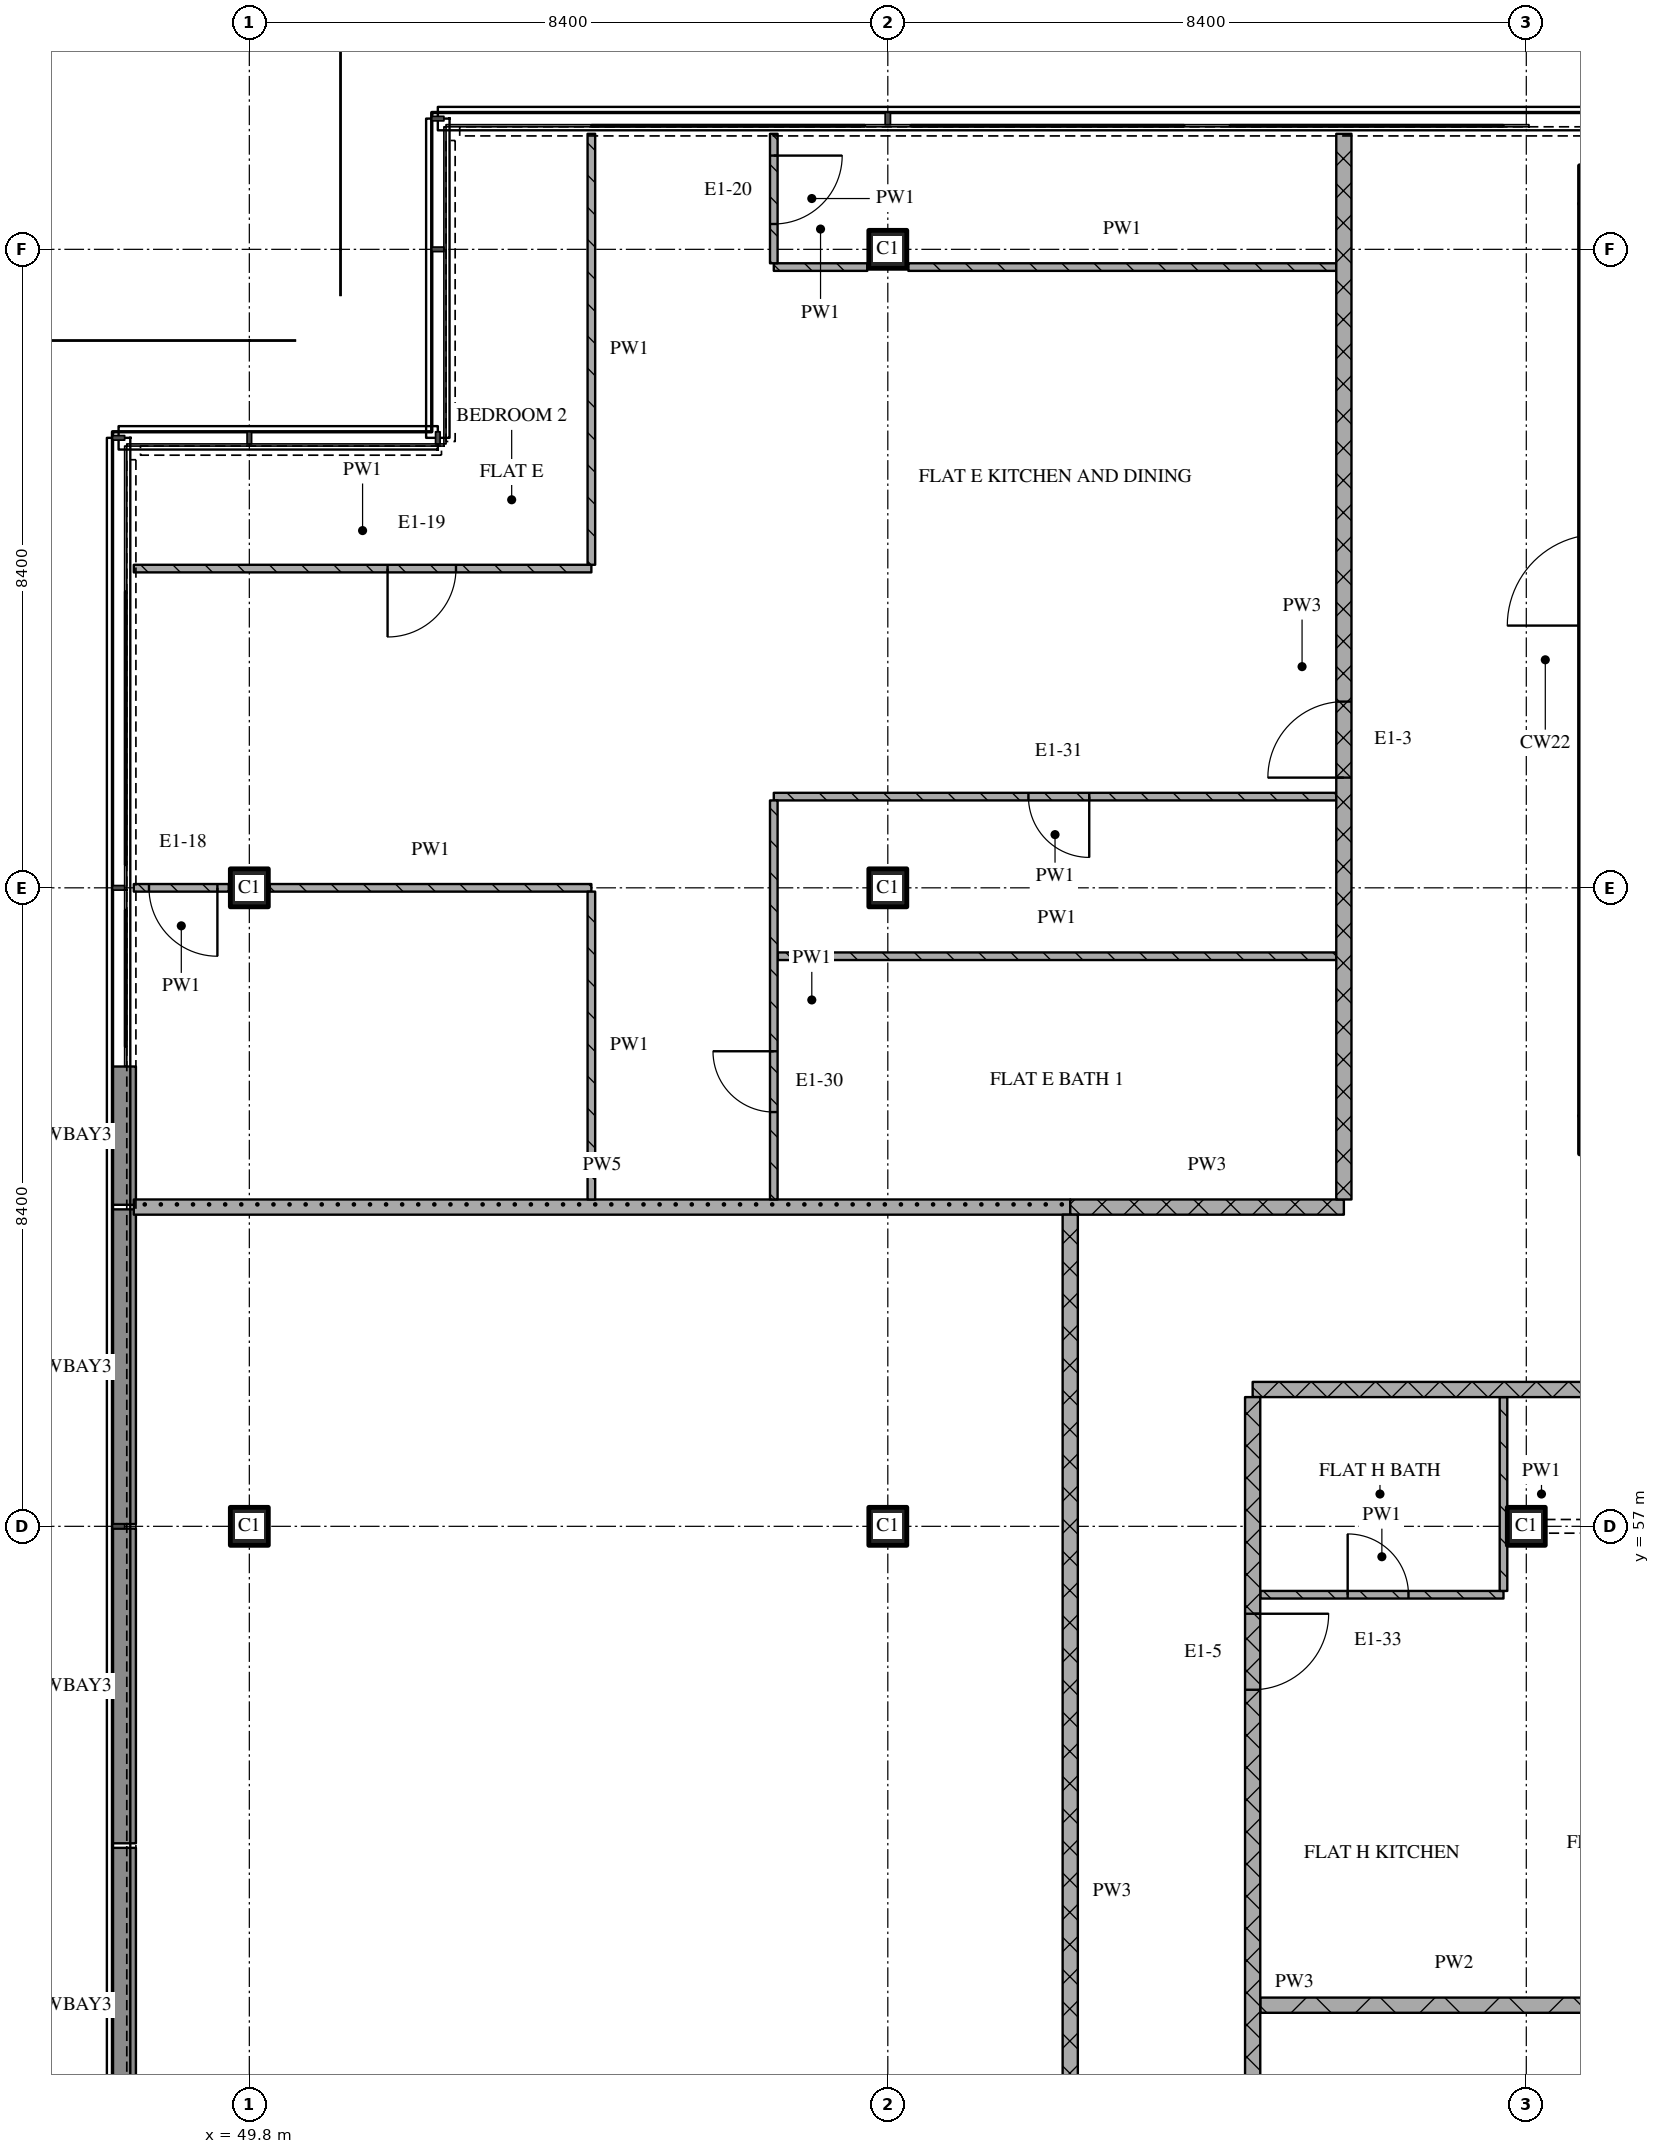
"""IFC4 building model, lengths in metres.
Left out: names, types, materials, properties, quantities, classifications, styles, units other than length and angle.
Written with IfcOpenShell. Run it as: python <this file> out.ifc"""

import sys

from ifc_helpers import new_model, si_unit, direction, frame, frame_2d, origin, origin_2d, place, context, subcontext, project, spatial, rectangle, extrude, element, fill, save


model = new_model("IFC4")
c1 = context("Model", 3, precision=1e-05, world=origin(), true_north=direction((0.0, 1.0)))
c2 = subcontext(c1, "Body", "Model", "MODEL_VIEW")
j1 = project(units=[si_unit("LENGTHUNIT", "METRE"), si_unit("PLANEANGLEUNIT", "RADIAN")], contexts=[c1])
p1 = place(None, origin())
s1 = spatial("IfcSite", under=j1, at=p1, CompositionType="ELEMENT")
p2 = place(p1, origin())
s2 = spatial("IfcBuilding", under=s1, at=p2, CompositionType="ELEMENT")
p3 = place(p2, frame((0.0, 0.0, 263.55)))
s3 = spatial("IfcBuildingStorey", under=s2, at=p3, CompositionType="ELEMENT", Elevation=263.55)
for number, where, z_axis, x_axis in (
    (1, (49.8, 57.0, 0.0), (0.0, 0.0, 1.0), (1.0, 0.0, 0.0)),
    (2, (49.8, 65.4, 0.0), (0.0, 0.0, 1.0), (1.0, 0.0, 0.0)),
    (3, (58.2, 57.0, 0.0), (0.0, 0.0, 1.0), (1.0, 0.0, 0.0)),
    (4, (58.2, 65.4, 0.0), (0.0, 0.0, 1.0), (1.0, 0.0, 0.0)),
    (5, (58.2, 73.8, 0.0), (0.0, 0.0, 1.0), (1.0, 0.0, 0.0)),
    (6, (66.6, 57.0, 0.0), (0.0, 0.0, 1.0), (1.0, 0.0, 0.0)),
):
    element("IfcColumn", number, at=place(p3, frame(where, z_axis=z_axis, x_axis=x_axis)), inside=s3, PredefinedType="COLUMN", context=c2, shape_type="SweptSolid", body=[
        extrude(rectangle(XDim=0.5, YDim=0.5, at=origin_2d()), origin(), (0.0, 0.0, 1.0), 3.6),
    ])
p4 = place(p3, frame((48.154, 61.23, 0.0), z_axis=(0.0, 0.0, 1.0), x_axis=(0.0, 1.0, 0.0)))
e7 = element("IfcWall", 7, at=p4, inside=s3, PredefinedType="SOLIDWALL", context=c2, shape_type="SweptSolid", body=[
    extrude(rectangle(XDim=1.819, YDim=0.308, at=frame_2d((0.91, 0.0))), origin(), (0.0, 0.0, 1.0), 3.2),
])
for number, where, z_axis, x_axis in (
    (8, (48.154, 57.03, 0.0), (0.0, 0.0, 1.0), (0.0, 1.0, 0.0)),
    (9, (48.154, 52.83, 0.0), (0.0, 0.0, 1.0), (0.0, 1.0, 0.0)),
):
    element("IfcWall", number, at=place(p3, frame(where, z_axis=z_axis, x_axis=x_axis)), inside=s3, PredefinedType="SOLIDWALL", context=c2, shape_type="SweptSolid", body=[
        extrude(rectangle(XDim=4.14, YDim=0.308, at=frame_2d((2.07, 0.0))), origin(), (0.0, 0.0, 1.0), 3.2),
    ])
p5 = place(p3, frame((48.154, 48.63, 0.0), z_axis=(0.0, 0.0, 1.0), x_axis=(0.0, 1.0, 0.0)))
e10 = element("IfcWall", 10, at=p5, inside=s3, PredefinedType="SOLIDWALL", context=c2, shape_type="SweptSolid", body=[
    extrude(rectangle(XDim=4.14, YDim=0.308, at=frame_2d((2.07, 0.0))), origin(), (0.0, 0.0, 1.0), 3.2),
])
p6 = place(p3, frame((67.3, 62.15, 0.0), z_axis=(0.0, 0.0, 1.0), x_axis=(1.0, 0.0, 0.0)))
e11 = element("IfcWall", 11, at=p6, inside=s3, PredefinedType="SOLIDWALL", context=c2, shape_type="SweptSolid", body=[
    extrude(rectangle(XDim=40.6, YDim=0.5, at=frame_2d((20.3, 0.0))), origin(), (0.0, 0.0, 1.0), 3.32),
])
p7 = place(p6, frame((20.65, 0.0, 0.0)))
e12 = element("IfcOpeningElement", 12, at=p7, cuts=e11, PredefinedType="OPENING", context=c2, shape_type="SweptSolid", body=[
    extrude(rectangle(XDim=1.8, YDim=2.1, at=frame_2d((0.9, 1.05))), frame((0.0, 0.26, 0.0), z_axis=(0.0, -1.0, 0.0), x_axis=(1.0, 0.0, 0.0)), (0.0, 0.0, 1.0), 0.52),
])
p8 = place(p3, frame((67.3, 74.65, 0.0), z_axis=(0.0, 0.0, 1.0), x_axis=(1.0, 0.0, 0.0)))
e13 = element("IfcWall", 13, at=p8, inside=s3, PredefinedType="SOLIDWALL", context=c2, shape_type="SweptSolid", body=[
    extrude(rectangle(XDim=40.6, YDim=0.5, at=frame_2d((20.3, 0.0))), origin(), (0.0, 0.0, 1.0), 3.32),
])
p9 = place(p3, frame((63.1, 50.7, 0.0), z_axis=(0.0, 0.0, 1.0), x_axis=(1.0, 0.0, 0.0)))
e14 = element("IfcWall", 14, at=p9, inside=s3, PredefinedType="PARTITIONING", context=c2, shape_type="SweptSolid", body=[
    extrude(rectangle(XDim=5.1, YDim=0.2, at=frame_2d((2.55, 0.0))), origin(), (0.0, 0.0, 1.0), 3.32),
])
p10 = place(p3, frame((63.1, 56.1, 0.0), z_axis=(0.0, 0.0, 1.0), x_axis=(1.0, 0.0, 0.0)))
e15 = element("IfcWall", 15, at=p10, inside=s3, PredefinedType="PARTITIONING", context=c2, shape_type="SweptSolid", body=[
    extrude(rectangle(XDim=3.2, YDim=0.1, at=frame_2d((1.6, 0.0))), origin(), (0.0, 0.0, 1.0), 3.32),
])
p11 = place(p10, frame((1.15, 0.0, 0.0)))
e16 = element("IfcOpeningElement", 16, at=p11, cuts=e15, PredefinedType="OPENING", context=c2, shape_type="SweptSolid", body=[
    extrude(rectangle(XDim=0.8, YDim=2.1, at=frame_2d((0.4, 1.05))), frame((0.0, 0.06, 0.0), z_axis=(0.0, -1.0, 0.0), x_axis=(1.0, 0.0, 0.0)), (0.0, 0.0, 1.0), 0.12),
])
p12 = place(p3, frame((63.0, 58.8, 0.0), z_axis=(0.0, 0.0, 1.0), x_axis=(1.0, 0.0, 0.0)))
e17 = element("IfcWall", 17, at=p12, inside=s3, PredefinedType="PARTITIONING", context=c2, shape_type="SweptSolid", body=[
    extrude(rectangle(XDim=10.8, YDim=0.2, at=frame_2d((5.4, 0.0))), origin(), (0.0, 0.0, 1.0), 3.32),
])
p13 = place(p3, frame((60.6, 61.2, 0.0), z_axis=(0.0, 0.0, 1.0), x_axis=(1.0, 0.0, 0.0)))
e18 = element("IfcWall", 18, at=p13, inside=s3, PredefinedType="PARTITIONING", context=c2, shape_type="SweptSolid", body=[
    extrude(rectangle(XDim=3.6, YDim=0.2, at=frame_2d((1.8, 0.0))), origin(), (0.0, 0.0, 1.0), 3.32),
])
p14 = place(p3, frame((48.28, 61.2, 0.0), z_axis=(0.0, 0.0, 1.0), x_axis=(1.0, 0.0, 0.0)))
e19 = element("IfcWall", 19, at=p14, inside=s3, PredefinedType="PARTITIONING", context=c2, shape_type="SweptSolid", body=[
    extrude(rectangle(XDim=12.32, YDim=0.2, at=frame_2d((6.16, 0.0))), origin(), (0.0, 0.0, 1.0), 3.32),
])
p15 = place(p3, frame((56.75, 64.5, 0.0), z_axis=(0.0, 0.0, 1.0), x_axis=(1.0, 0.0, 0.0)))
e20 = element("IfcWall", 20, at=p15, inside=s3, PredefinedType="PARTITIONING", context=c2, shape_type="SweptSolid", body=[
    extrude(rectangle(XDim=7.35, YDim=0.1, at=frame_2d((3.675, 0.0))), origin(), (0.0, 0.0, 1.0), 3.32),
])
p16 = place(p3, frame((49.53, 65.4, 0.0), z_axis=(0.0, 0.0, 1.0), x_axis=(-1.0, 0.0, 0.0)))
e21 = element("IfcWall", 21, at=p16, inside=s3, PredefinedType="PARTITIONING", context=c2, shape_type="SweptSolid", body=[
    extrude(rectangle(XDim=1.25, YDim=0.1, at=frame_2d((0.625, 0.0))), origin(), (0.0, 0.0, 1.0), 3.32),
])
p17 = place(p16, frame((0.15, 0.0, 0.0)))
e22 = element("IfcOpeningElement", 22, at=p17, cuts=e21, PredefinedType="OPENING", context=c2, shape_type="SweptSolid", body=[
    extrude(rectangle(XDim=0.9, YDim=2.1, at=frame_2d((0.45, 1.05))), frame((0.0, 0.06, 0.0), z_axis=(0.0, -1.0, 0.0), x_axis=(1.0, 0.0, 0.0)), (0.0, 0.0, 1.0), 0.12),
])
p18 = place(p3, frame((50.07, 65.4, 0.0), z_axis=(0.0, 0.0, 1.0), x_axis=(1.0, 0.0, 0.0)))
e23 = element("IfcWall", 23, at=p18, inside=s3, PredefinedType="PARTITIONING", context=c2, shape_type="SweptSolid", body=[
    extrude(rectangle(XDim=4.23, YDim=0.1, at=frame_2d((2.115, 0.0))), origin(), (0.0, 0.0, 1.0), 3.32),
])
p19 = place(p3, frame((64.1, 66.6, 0.0), z_axis=(0.0, 0.0, 1.0), x_axis=(-1.0, 0.0, 0.0)))
e24 = element("IfcWall", 24, at=p19, inside=s3, PredefinedType="PARTITIONING", context=c2, shape_type="SweptSolid", body=[
    extrude(rectangle(XDim=7.4, YDim=0.1, at=frame_2d((3.7, 0.0))), origin(), (0.0, 0.0, 1.0), 3.32),
])
p20 = place(p19, frame((3.25, 0.0, 0.0)))
e25 = element("IfcOpeningElement", 25, at=p20, cuts=e24, PredefinedType="OPENING", context=c2, shape_type="SweptSolid", body=[
    extrude(rectangle(XDim=0.8, YDim=2.1, at=frame_2d((0.4, 1.05))), frame((0.0, 0.06, 0.0), z_axis=(0.0, -1.0, 0.0), x_axis=(1.0, 0.0, 0.0)), (0.0, 0.0, 1.0), 0.12),
])
p21 = place(p3, frame((48.28, 69.6, 0.0), z_axis=(0.0, 0.0, 1.0), x_axis=(1.0, 0.0, 0.0)))
e26 = element("IfcWall", 26, at=p21, inside=s3, PredefinedType="PARTITIONING", context=c2, shape_type="SweptSolid", body=[
    extrude(rectangle(XDim=6.02, YDim=0.1, at=frame_2d((3.01, 0.0))), origin(), (0.0, 0.0, 1.0), 3.32),
])
p22 = place(p21, frame((3.339, 0.0, 0.0)))
e27 = element("IfcOpeningElement", 27, at=p22, cuts=e26, PredefinedType="OPENING", context=c2, shape_type="SweptSolid", body=[
    extrude(rectangle(XDim=0.9, YDim=2.1, at=frame_2d((0.45, 1.05))), frame((0.0, 0.06, 0.0), z_axis=(0.0, -1.0, 0.0), x_axis=(1.0, 0.0, 0.0)), (0.0, 0.0, 1.0), 0.12),
])
p23 = place(p3, frame((56.7, 73.567, 0.0), z_axis=(0.0, 0.0, 1.0), x_axis=(1.0, 0.0, 0.0)))
e28 = element("IfcWall", 28, at=p23, inside=s3, PredefinedType="PARTITIONING", context=c2, shape_type="SweptSolid", body=[
    extrude(rectangle(XDim=1.23, YDim=0.1, at=frame_2d((0.615, 0.0))), origin(), (0.0, 0.0, 1.0), 3.32),
])
p24 = place(p3, frame((58.47, 73.567, 0.0), z_axis=(0.0, 0.0, 1.0), x_axis=(1.0, 0.0, 0.0)))
e29 = element("IfcWall", 29, at=p24, inside=s3, PredefinedType="PARTITIONING", context=c2, shape_type="SweptSolid", body=[
    extrude(rectangle(XDim=5.63, YDim=0.1, at=frame_2d((2.815, 0.0))), origin(), (0.0, 0.0, 1.0), 3.32),
])
p25 = place(p3, frame((54.3, 65.35, 0.0), z_axis=(0.0, 0.0, 1.0), x_axis=(0.0, -1.0, 0.0)))
e30 = element("IfcWall", 30, at=p25, inside=s3, PredefinedType="PARTITIONING", context=c2, shape_type="SweptSolid", body=[
    extrude(rectangle(XDim=4.05, YDim=0.1, at=frame_2d((2.025, 0.0))), origin(), (0.0, 0.0, 1.0), 3.32),
])
p26 = place(p3, frame((54.3, 75.32, 0.0), z_axis=(0.0, 0.0, 1.0), x_axis=(0.0, -1.0, 0.0)))
e31 = element("IfcWall", 31, at=p26, inside=s3, PredefinedType="PARTITIONING", context=c2, shape_type="SweptSolid", body=[
    extrude(rectangle(XDim=5.67, YDim=0.1, at=frame_2d((2.835, 0.0))), origin(), (0.0, 0.0, 1.0), 3.32),
])
p27 = place(p3, frame((56.7, 66.55, 0.0), z_axis=(0.0, 0.0, 1.0), x_axis=(0.0, -1.0, 0.0)))
e32 = element("IfcWall", 32, at=p27, inside=s3, PredefinedType="PARTITIONING", context=c2, shape_type="SweptSolid", body=[
    extrude(rectangle(XDim=5.25, YDim=0.1, at=frame_2d((2.625, 0.0))), origin(), (0.0, 0.0, 1.0), 3.32),
])
p28 = place(p27, frame((3.3, 0.0, 0.0)))
e33 = element("IfcOpeningElement", 33, at=p28, cuts=e32, PredefinedType="OPENING", context=c2, shape_type="SweptSolid", body=[
    extrude(rectangle(XDim=0.8, YDim=2.1, at=frame_2d((0.4, 1.05))), frame((0.0, 0.06, 0.0), z_axis=(0.0, -1.0, 0.0), x_axis=(1.0, 0.0, 0.0)), (0.0, 0.0, 1.0), 0.12),
])
p29 = place(p3, frame((56.7, 75.32, 0.0), z_axis=(0.0, 0.0, 1.0), x_axis=(0.0, -1.0, 0.0)))
e34 = element("IfcWall", 34, at=p29, inside=s3, PredefinedType="PARTITIONING", context=c2, shape_type="SweptSolid", body=[
    extrude(rectangle(XDim=1.703, YDim=0.1, at=frame_2d((0.852, 0.0))), origin(), (0.0, 0.0, 1.0), 3.32),
])
p30 = place(p29, frame((0.287, 0.0, 0.0)))
e35 = element("IfcOpeningElement", 35, at=p30, cuts=e34, PredefinedType="OPENING", context=c2, shape_type="SweptSolid", body=[
    extrude(rectangle(XDim=0.9, YDim=2.1, at=frame_2d((0.45, 1.05))), frame((0.0, 0.06, 0.0), z_axis=(0.0, -1.0, 0.0), x_axis=(1.0, 0.0, 0.0)), (0.0, 0.0, 1.0), 0.12),
])
p31 = place(p3, frame((60.6, 61.1, 0.0), z_axis=(0.0, 0.0, 1.0), x_axis=(0.0, -1.0, 0.0)))
e36 = element("IfcWall", 36, at=p31, inside=s3, PredefinedType="PARTITIONING", context=c2, shape_type="SweptSolid", body=[
    extrude(rectangle(XDim=17.8, YDim=0.2, at=frame_2d((8.9, 0.0))), origin(), (0.0, 0.0, 1.0), 3.32),
])
p32 = place(p3, frame((63.0, 58.7, 0.0), z_axis=(0.0, 0.0, 1.0), x_axis=(0.0, -1.0, 0.0)))
e37 = element("IfcWall", 37, at=p32, inside=s3, PredefinedType="PARTITIONING", context=c2, shape_type="SweptSolid", body=[
    extrude(rectangle(XDim=15.4, YDim=0.2, at=frame_2d((7.7, 0.0))), origin(), (0.0, 0.0, 1.0), 3.32),
])
p33 = place(p32, frame((2.85, 0.0, 0.0)))
e38 = element("IfcOpeningElement", 38, at=p33, cuts=e37, PredefinedType="OPENING", context=c2, shape_type="SweptSolid", body=[
    extrude(rectangle(XDim=1.0, YDim=2.1, at=frame_2d((0.5, 1.05))), frame((0.0, 0.11, 0.0), z_axis=(0.0, -1.0, 0.0), x_axis=(1.0, 0.0, 0.0)), (0.0, 0.0, 1.0), 0.22),
])
p34 = place(p32, frame((11.25, 0.0, 0.0)))
e39 = element("IfcOpeningElement", 39, at=p34, cuts=e37, PredefinedType="OPENING", context=c2, shape_type="SweptSolid", body=[
    extrude(rectangle(XDim=0.9, YDim=2.1, at=frame_2d((0.45, 1.05))), frame((0.0, 0.11, 0.0), z_axis=(0.0, -1.0, 0.0), x_axis=(1.0, 0.0, 0.0)), (0.0, 0.0, 1.0), 0.22),
])
p35 = place(p3, frame((64.2, 61.3, 0.0), z_axis=(0.0, 0.0, 1.0), x_axis=(0.0, 1.0, 0.0)))
e40 = element("IfcWall", 40, at=p35, inside=s3, PredefinedType="PARTITIONING", context=c2, shape_type="SweptSolid", body=[
    extrude(rectangle(XDim=14.02, YDim=0.2, at=frame_2d((7.01, 0.0))), origin(), (0.0, 0.0, 1.0), 3.32),
])
p36 = place(p35, frame((5.55, 0.0, 0.0)))
e41 = element("IfcOpeningElement", 41, at=p36, cuts=e40, PredefinedType="OPENING", context=c2, shape_type="SweptSolid", body=[
    extrude(rectangle(XDim=1.0, YDim=2.1, at=frame_2d((0.5, 1.05))), frame((0.0, 0.11, 0.0), z_axis=(0.0, -1.0, 0.0), x_axis=(1.0, 0.0, 0.0)), (0.0, 0.0, 1.0), 0.22),
])
p37 = place(p3, frame((66.3, 58.7, 0.0), z_axis=(0.0, 0.0, 1.0), x_axis=(0.0, -1.0, 0.0)))
e42 = element("IfcWall", 42, at=p37, inside=s3, PredefinedType="PARTITIONING", context=c2, shape_type="SweptSolid", body=[
    extrude(rectangle(XDim=2.55, YDim=0.1, at=frame_2d((1.275, 0.0))), origin(), (0.0, 0.0, 1.0), 3.32),
])
p38 = place(p11, origin())
e43 = element("IfcDoor", 43, at=p38, inside=s3, OperationType="SINGLE_SWING_LEFT", PredefinedType="DOOR", context=c2, shape_type="SweptSolid", body=[
    extrude(rectangle(XDim=0.8, YDim=2.1, at=frame_2d((0.4, 1.05))), frame((0.0, 0.025, 0.0), z_axis=(0.0, -1.0, 0.0), x_axis=(1.0, 0.0, 0.0)), (0.0, 0.0, 1.0), 0.05),
])
fill(e16, e43)
p39 = place(p17, origin())
e44 = element("IfcDoor", 44, at=p39, inside=s3, OperationType="SINGLE_SWING_LEFT", PredefinedType="DOOR", context=c2, shape_type="SweptSolid", body=[
    extrude(rectangle(XDim=0.9, YDim=2.1, at=frame_2d((0.45, 1.05))), frame((0.0, 0.025, 0.0), z_axis=(0.0, -1.0, 0.0), x_axis=(1.0, 0.0, 0.0)), (0.0, 0.0, 1.0), 0.05),
])
fill(e22, e44)
p40 = place(p20, origin())
e45 = element("IfcDoor", 45, at=p40, inside=s3, OperationType="SINGLE_SWING_LEFT", PredefinedType="DOOR", context=c2, shape_type="SweptSolid", body=[
    extrude(rectangle(XDim=0.8, YDim=2.1, at=frame_2d((0.4, 1.05))), frame((0.0, 0.025, 0.0), z_axis=(0.0, -1.0, 0.0), x_axis=(1.0, 0.0, 0.0)), (0.0, 0.0, 1.0), 0.05),
])
fill(e25, e45)
p41 = place(p22, origin())
e46 = element("IfcDoor", 46, at=p41, inside=s3, OperationType="SINGLE_SWING_RIGHT", PredefinedType="DOOR", context=c2, shape_type="SweptSolid", body=[
    extrude(rectangle(XDim=0.9, YDim=2.1, at=frame_2d((0.45, 1.05))), frame((0.0, 0.025, 0.0), z_axis=(0.0, -1.0, 0.0), x_axis=(1.0, 0.0, 0.0)), (0.0, 0.0, 1.0), 0.05),
])
fill(e27, e46)
p42 = place(p28, origin())
e47 = element("IfcDoor", 47, at=p42, inside=s3, OperationType="SINGLE_SWING_RIGHT", PredefinedType="DOOR", context=c2, shape_type="SweptSolid", body=[
    extrude(rectangle(XDim=0.8, YDim=2.1, at=frame_2d((0.4, 1.05))), frame((0.0, 0.025, 0.0), z_axis=(0.0, -1.0, 0.0), x_axis=(1.0, 0.0, 0.0)), (0.0, 0.0, 1.0), 0.05),
])
fill(e33, e47)
p43 = place(p30, origin())
e48 = element("IfcDoor", 48, at=p43, inside=s3, OperationType="SINGLE_SWING_LEFT", PredefinedType="DOOR", context=c2, shape_type="SweptSolid", body=[
    extrude(rectangle(XDim=0.9, YDim=2.1, at=frame_2d((0.45, 1.05))), frame((0.0, 0.025, 0.0), z_axis=(0.0, -1.0, 0.0), x_axis=(1.0, 0.0, 0.0)), (0.0, 0.0, 1.0), 0.05),
])
fill(e35, e48)
p44 = place(p33, origin())
e49 = element("IfcDoor", 49, at=p44, inside=s3, OperationType="SINGLE_SWING_LEFT", PredefinedType="DOOR", context=c2, shape_type="SweptSolid", body=[
    extrude(rectangle(XDim=1.0, YDim=2.1, at=frame_2d((0.5, 1.05))), frame((0.0, 0.025, 0.0), z_axis=(0.0, -1.0, 0.0), x_axis=(1.0, 0.0, 0.0)), (0.0, 0.0, 1.0), 0.05),
])
fill(e38, e49)
p45 = place(p36, origin())
e50 = element("IfcDoor", 50, at=p45, inside=s3, OperationType="SINGLE_SWING_LEFT", PredefinedType="DOOR", context=c2, shape_type="SweptSolid", body=[
    extrude(rectangle(XDim=1.0, YDim=2.1, at=frame_2d((0.5, 1.05))), frame((0.0, 0.025, 0.0), z_axis=(0.0, -1.0, 0.0), x_axis=(1.0, 0.0, 0.0)), (0.0, 0.0, 1.0), 0.05),
])
fill(e41, e50)
save(model, sys.argv[1])
